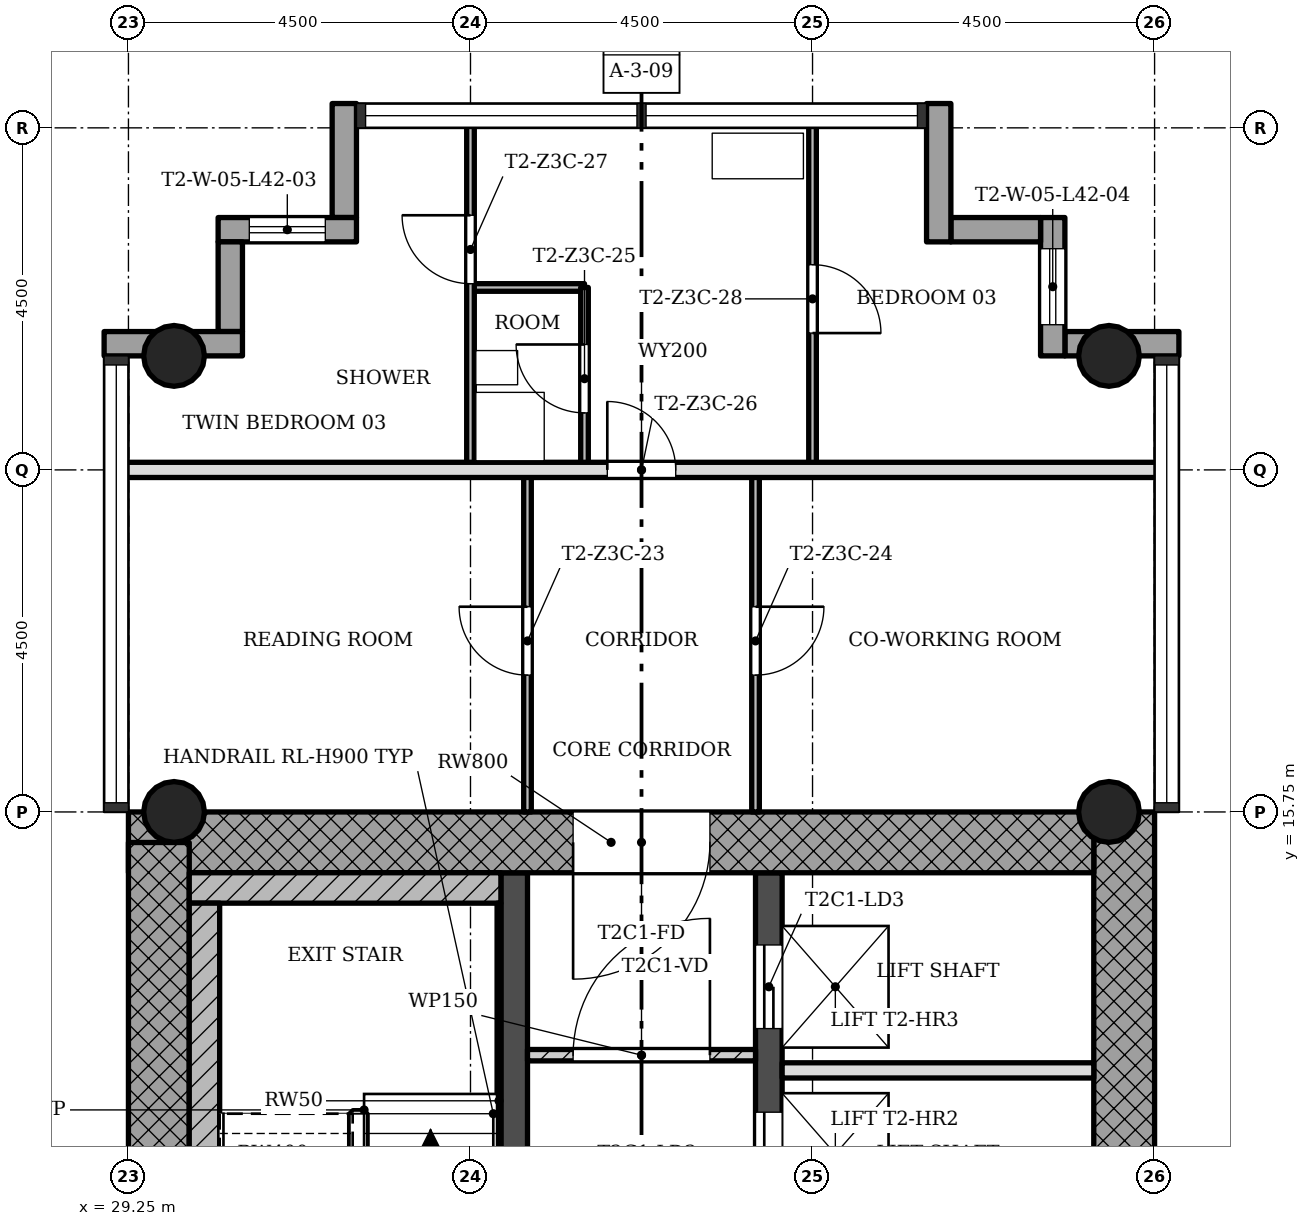
"""IFC4 building model, lengths in metres.
Left out: names, types, materials, properties, quantities, classifications, styles, units other than length and angle.
Written with IfcOpenShell. Run it as: python <this file> out.ifc"""

import sys

from ifc_helpers import new_model, si_unit, direction, frame, frame_2d, origin, origin_2d, place, context, subcontext, project, spatial, rectangle, hollow_circle, extrude, element, fill, save


model = new_model("IFC4")
c1 = context("Model", 3, precision=1e-05, world=origin(), true_north=direction((0.0, 1.0)))
c2 = subcontext(c1, "Body", "Model", "MODEL_VIEW")
j1 = project(units=[si_unit("LENGTHUNIT", "METRE"), si_unit("PLANEANGLEUNIT", "RADIAN")], contexts=[c1])
p1 = place(None, origin())
s1 = spatial("IfcSite", under=j1, at=p1, CompositionType="ELEMENT")
p2 = place(p1, origin())
s2 = spatial("IfcBuilding", under=s1, at=p2, CompositionType="ELEMENT")
p3 = place(p2, frame((0.0, 0.0, 154.1)))
s3 = spatial("IfcBuildingStorey", under=s2, at=p3, CompositionType="ELEMENT", Elevation=154.1)
p4 = place(p3, frame((42.35, 7.55, 0.0), z_axis=(0.0, 0.0, 1.0), x_axis=(0.0, 1.0, 0.0)))
e1 = element("IfcWall", 1, at=p4, inside=s3, PredefinedType="SHEAR", context=c2, shape_type="SweptSolid", body=[
    extrude(rectangle(XDim=8.2, YDim=0.8, at=frame_2d((4.1, 0.0))), origin(), (0.0, 0.0, 1.0), 3.4),
])
p5 = place(p3, frame((41.95, 15.35, 0.0), z_axis=(0.0, 0.0, 1.0), x_axis=(-1.0, 0.0, 0.0)))
e2 = element("IfcWall", 2, at=p5, inside=s3, PredefinedType="SHEAR", context=c2, shape_type="SweptSolid", body=[
    extrude(rectangle(XDim=12.7, YDim=0.8, at=frame_2d((6.35, 0.0))), origin(), (0.0, 0.0, 1.0), 3.4),
])
p6 = place(p5, frame((5.05, 0.0, 0.0)))
e3 = element("IfcOpeningElement", 3, at=p6, cuts=e2, PredefinedType="OPENING", context=c2, shape_type="SweptSolid", body=[
    extrude(rectangle(XDim=1.8, YDim=2.1, at=frame_2d((0.9, 1.05))), frame((0.0, 0.41, 0.0), z_axis=(0.0, -1.0, 0.0), x_axis=(1.0, 0.0, 0.0)), (0.0, 0.0, 1.0), 0.82),
])
p7 = place(p3, frame((29.65, 15.348, 0.0), z_axis=(0.0, 0.0, 1.0), x_axis=(0.0, -1.0, 0.0)))
e4 = element("IfcWall", 4, at=p7, inside=s3, PredefinedType="SHEAR", context=c2, shape_type="SweptSolid", body=[
    extrude(rectangle(XDim=8.796, YDim=0.8, at=frame_2d((4.398, 0.0))), origin(), (0.0, 0.0, 1.0), 3.4),
])
p8 = place(p3, frame((34.325, 7.55, 0.0), z_axis=(0.0, 0.0, 1.0), x_axis=(0.0, 1.0, 0.0)))
e5 = element("IfcWall", 5, at=p8, inside=s3, PredefinedType="SHEAR", context=c2, shape_type="SweptSolid", body=[
    extrude(rectangle(XDim=7.4, YDim=0.35, at=frame_2d((3.7, 0.0))), origin(), (0.0, 0.0, 1.0), 3.4),
])
p9 = place(p8, frame((0.85, 0.0, 0.0)))
e6 = element("IfcOpeningElement", 6, at=p9, cuts=e5, PredefinedType="OPENING", context=c2, shape_type="SweptSolid", body=[
    extrude(rectangle(XDim=0.9, YDim=2.1, at=frame_2d((0.45, 1.05))), frame((0.0, 0.185, 0.0), z_axis=(0.0, -1.0, 0.0), x_axis=(1.0, 0.0, 0.0)), (0.0, 0.0, 1.0), 0.37),
])
p10 = place(p3, frame((37.675, 7.55, 0.0), z_axis=(0.0, 0.0, 1.0), x_axis=(0.0, 1.0, 0.0)))
e7 = element("IfcWall", 7, at=p10, inside=s3, PredefinedType="SHEAR", context=c2, shape_type="SweptSolid", body=[
    extrude(rectangle(XDim=7.4, YDim=0.35, at=frame_2d((3.7, 0.0))), origin(), (0.0, 0.0, 1.0), 3.4),
])
p11 = place(p10, frame((0.95, 0.0, 0.0)))
e8 = element("IfcOpeningElement", 8, at=p11, cuts=e7, PredefinedType="OPENING", context=c2, shape_type="SweptSolid", body=[
    extrude(rectangle(XDim=1.1, YDim=2.1, at=frame_2d((0.55, 1.05))), frame((0.0, 0.185, 0.0), z_axis=(0.0, -1.0, 0.0), x_axis=(1.0, 0.0, 0.0)), (0.0, 0.0, 1.0), 0.37),
])
p12 = place(p10, frame((3.15, 0.0, 0.0)))
e9 = element("IfcOpeningElement", 9, at=p12, cuts=e7, PredefinedType="OPENING", context=c2, shape_type="SweptSolid", body=[
    extrude(rectangle(XDim=1.1, YDim=2.1, at=frame_2d((0.55, 1.05))), frame((0.0, 0.185, 0.0), z_axis=(0.0, -1.0, 0.0), x_axis=(1.0, 0.0, 0.0)), (0.0, 0.0, 1.0), 0.37),
])
p13 = place(p10, frame((5.35, 0.0, 0.0)))
e10 = element("IfcOpeningElement", 10, at=p13, cuts=e7, PredefinedType="OPENING", context=c2, shape_type="SweptSolid", body=[
    extrude(rectangle(XDim=1.1, YDim=2.1, at=frame_2d((0.55, 1.05))), frame((0.0, 0.185, 0.0), z_axis=(0.0, -1.0, 0.0), x_axis=(1.0, 0.0, 0.0)), (0.0, 0.0, 1.0), 0.37),
])
for number, where, z_axis, x_axis in (
    (11, (42.15, 15.75, 0.0), (0.0, 0.0, 1.0), (1.0, 0.0, 0.0)),
    (12, (29.85, 15.75, 0.0), (0.0, 0.0, 1.0), (1.0, 0.0, 0.0)),
    (13, (42.15, 21.75, 0.0), (0.0, 0.0, 1.0), (1.0, 0.0, 0.0)),
    (14, (29.85, 21.75, 0.0), (0.0, 0.0, 1.0), (1.0, 0.0, 0.0)),
):
    element("IfcColumn", number, at=place(p3, frame(where, z_axis=z_axis, x_axis=x_axis)), inside=s3, PredefinedType="COLUMN", context=c2, shape_type="SweptSolid", body=[
        extrude(hollow_circle(Radius=0.4, WallThickness=0.028, at=origin_2d()), origin(), (0.0, 0.0, 1.0), 3.4),
    ])
p14 = place(p3, frame((43.07, 21.91, -0.3), z_axis=(0.0, 0.0, 1.0), x_axis=(-1.0, 0.0, 0.0)))
e15 = element("IfcWall", 15, at=p14, inside=s3, PredefinedType="STANDARD", context=c2, shape_type="SweptSolid", body=[
    extrude(rectangle(XDim=1.5, YDim=0.32, at=frame_2d((0.75, 0.0))), origin(), (0.0, 0.0, 1.0), 3.4),
])
p15 = place(p3, frame((41.41, 21.75, -0.3), z_axis=(0.0, 0.0, 1.0), x_axis=(0.0, 1.0, 0.0)))
e16 = element("IfcWall", 16, at=p15, inside=s3, PredefinedType="STANDARD", context=c2, shape_type="SweptSolid", body=[
    extrude(rectangle(XDim=1.82, YDim=0.32, at=frame_2d((0.91, 0.0))), origin(), (0.0, 0.0, 1.0), 3.4),
])
p16 = place(p15, frame((0.41, 0.0, 1.2)))
e17 = element("IfcOpeningElement", 17, at=p16, cuts=e16, PredefinedType="OPENING", context=c2, shape_type="SweptSolid", body=[
    extrude(rectangle(XDim=1.0, YDim=1.5, at=frame_2d((0.5, 0.75))), frame((0.0, 0.17, 0.0), z_axis=(0.0, -1.0, 0.0), x_axis=(1.0, 0.0, 0.0)), (0.0, 0.0, 1.0), 0.34),
])
p17 = place(p3, frame((41.25, 23.41, -0.3), z_axis=(0.0, 0.0, 1.0), x_axis=(-1.0, 0.0, 0.0)))
e18 = element("IfcWall", 18, at=p17, inside=s3, PredefinedType="STANDARD", context=c2, shape_type="SweptSolid", body=[
    extrude(rectangle(XDim=1.18, YDim=0.32, at=frame_2d((0.59, 0.0))), origin(), (0.0, 0.0, 1.0), 3.4),
])
p18 = place(p3, frame((39.91, 23.25, -0.3), z_axis=(0.0, 0.0, 1.0), x_axis=(0.0, 1.0, 0.0)))
e19 = element("IfcWall", 19, at=p18, inside=s3, PredefinedType="STANDARD", context=c2, shape_type="SweptSolid", body=[
    extrude(rectangle(XDim=1.82, YDim=0.32, at=frame_2d((0.91, 0.0))), origin(), (0.0, 0.0, 1.0), 3.4),
])
p19 = place(p3, frame((32.09, 25.07, -0.3), z_axis=(0.0, 0.0, 1.0), x_axis=(0.0, -1.0, 0.0)))
e20 = element("IfcWall", 20, at=p19, inside=s3, PredefinedType="STANDARD", context=c2, shape_type="SweptSolid", body=[
    extrude(rectangle(XDim=1.5, YDim=0.32, at=frame_2d((0.75, 0.0))), origin(), (0.0, 0.0, 1.0), 3.4),
])
p20 = place(p3, frame((32.25, 23.41, -0.3), z_axis=(0.0, 0.0, 1.0), x_axis=(-1.0, 0.0, 0.0)))
e21 = element("IfcWall", 21, at=p20, inside=s3, PredefinedType="STANDARD", context=c2, shape_type="SweptSolid", body=[
    extrude(rectangle(XDim=1.82, YDim=0.32, at=frame_2d((0.91, 0.0))), origin(), (0.0, 0.0, 1.0), 3.4),
])
p21 = place(p20, frame((0.41, 0.0, 1.2)))
e22 = element("IfcOpeningElement", 22, at=p21, cuts=e21, PredefinedType="OPENING", context=c2, shape_type="SweptSolid", body=[
    extrude(rectangle(XDim=1.0, YDim=1.5, at=frame_2d((0.5, 0.75))), frame((0.0, 0.17, 0.0), z_axis=(0.0, -1.0, 0.0), x_axis=(1.0, 0.0, 0.0)), (0.0, 0.0, 1.0), 0.34),
])
p22 = place(p3, frame((30.59, 23.25, -0.3), z_axis=(0.0, 0.0, 1.0), x_axis=(0.0, -1.0, 0.0)))
e23 = element("IfcWall", 23, at=p22, inside=s3, PredefinedType="STANDARD", context=c2, shape_type="SweptSolid", body=[
    extrude(rectangle(XDim=1.18, YDim=0.32, at=frame_2d((0.59, 0.0))), origin(), (0.0, 0.0, 1.0), 3.4),
])
p23 = place(p3, frame((30.75, 21.91, -0.3), z_axis=(0.0, 0.0, 1.0), x_axis=(-1.0, 0.0, 0.0)))
e24 = element("IfcWall", 24, at=p23, inside=s3, PredefinedType="STANDARD", context=c2, shape_type="SweptSolid", body=[
    extrude(rectangle(XDim=1.82, YDim=0.32, at=frame_2d((0.91, 0.0))), origin(), (0.0, 0.0, 1.0), 3.4),
])
p24 = place(p3, frame((37.5, 12.55, 0.0), z_axis=(0.0, 0.0, 1.0), x_axis=(-1.0, 0.0, 0.0)))
e25 = element("IfcWall", 25, at=p24, inside=s3, PredefinedType="PARTITIONING", context=c2, shape_type="SweptSolid", body=[
    extrude(rectangle(XDim=3.0, YDim=0.15, at=frame_2d((1.5, 0.0))), origin(), (0.0, 0.0, 1.0), 3.0),
])
p25 = place(p24, frame((0.6, 0.0, 0.0)))
e26 = element("IfcOpeningElement", 26, at=p25, cuts=e25, PredefinedType="OPENING", context=c2, shape_type="SweptSolid", body=[
    extrude(rectangle(XDim=1.8, YDim=2.1, at=frame_2d((0.9, 1.05))), frame((0.0, 0.085, 0.0), z_axis=(0.0, -1.0, 0.0), x_axis=(1.0, 0.0, 0.0)), (0.0, 0.0, 1.0), 0.17),
])
p26 = place(p3, frame((41.95, 12.35, 0.0), z_axis=(0.0, 0.0, 1.0), x_axis=(-1.0, 0.0, 0.0)))
e27 = element("IfcWall", 27, at=p26, inside=s3, PredefinedType="SOLIDWALL", context=c2, shape_type="SweptSolid", body=[
    extrude(rectangle(XDim=4.1, YDim=0.2, at=frame_2d((2.05, 0.0))), origin(), (0.0, 0.0, 1.0), 3.0),
])
p27 = place(p3, frame((42.85, 20.25, 0.0), z_axis=(0.0, 0.0, 1.0), x_axis=(-1.0, 0.0, 0.0)))
e28 = element("IfcWall", 28, at=p27, inside=s3, PredefinedType="SOLIDWALL", context=c2, shape_type="SweptSolid", body=[
    extrude(rectangle(XDim=13.7, YDim=0.2, at=frame_2d((6.85, 0.0))), origin(), (0.0, 0.0, 1.0), 3.0),
])
p28 = place(p27, frame((6.4, 0.0, 0.0)))
e29 = element("IfcOpeningElement", 29, at=p28, cuts=e28, PredefinedType="OPENING", context=c2, shape_type="SweptSolid", body=[
    extrude(rectangle(XDim=0.9, YDim=2.1, at=frame_2d((0.45, 1.05))), frame((0.0, 0.11, 0.0), z_axis=(0.0, -1.0, 0.0), x_axis=(1.0, 0.0, 0.0)), (0.0, 0.0, 1.0), 0.22),
])
p29 = place(p3, frame((35.25, 22.65, 0.0), z_axis=(0.0, 0.0, 1.0), x_axis=(-1.0, 0.0, 0.0)))
e30 = element("IfcWall", 30, at=p29, inside=s3, PredefinedType="PARTITIONING", context=c2, shape_type="SweptSolid", body=[
    extrude(rectangle(XDim=1.5, YDim=0.1, at=frame_2d((0.75, 0.0))), origin(), (0.0, 0.0, 1.0), 3.0),
])
p30 = place(p3, frame((38.25, 20.25, 0.0), z_axis=(0.0, 0.0, 1.0), x_axis=(0.0, 1.0, 0.0)))
e31 = element("IfcWall", 31, at=p30, inside=s3, PredefinedType="PARTITIONING", context=c2, shape_type="SweptSolid", body=[
    extrude(rectangle(XDim=4.6, YDim=0.1, at=frame_2d((2.3, 0.0))), origin(), (0.0, 0.0, 1.0), 3.0),
])
p31 = place(p30, frame((1.8, 0.0, 0.0)))
e32 = element("IfcOpeningElement", 32, at=p31, cuts=e31, PredefinedType="OPENING", context=c2, shape_type="SweptSolid", body=[
    extrude(rectangle(XDim=0.9, YDim=2.1, at=frame_2d((0.45, 1.05))), frame((0.0, 0.06, 0.0), z_axis=(0.0, -1.0, 0.0), x_axis=(1.0, 0.0, 0.0)), (0.0, 0.0, 1.0), 0.12),
])
p32 = place(p3, frame((37.5, 15.75, 0.0), z_axis=(0.0, 0.0, 1.0), x_axis=(0.0, 1.0, 0.0)))
e33 = element("IfcWall", 33, at=p32, inside=s3, PredefinedType="PARTITIONING", context=c2, shape_type="SweptSolid", body=[
    extrude(rectangle(XDim=4.5, YDim=0.1, at=frame_2d((2.25, 0.0))), origin(), (0.0, 0.0, 1.0), 3.0),
])
p33 = place(p32, frame((1.8, 0.0, 0.0)))
e34 = element("IfcOpeningElement", 34, at=p33, cuts=e33, PredefinedType="OPENING", context=c2, shape_type="SweptSolid", body=[
    extrude(rectangle(XDim=0.9, YDim=2.1, at=frame_2d((0.45, 1.05))), frame((0.0, 0.06, 0.0), z_axis=(0.0, -1.0, 0.0), x_axis=(1.0, 0.0, 0.0)), (0.0, 0.0, 1.0), 0.12),
])
p34 = place(p3, frame((35.25, 20.25, 0.0), z_axis=(0.0, 0.0, 1.0), x_axis=(0.0, 1.0, 0.0)))
e35 = element("IfcWall", 35, at=p34, inside=s3, PredefinedType="PARTITIONING", context=c2, shape_type="SweptSolid", body=[
    extrude(rectangle(XDim=2.4, YDim=0.1, at=frame_2d((1.2, 0.0))), origin(), (0.0, 0.0, 1.0), 3.0),
])
p35 = place(p34, frame((0.75, 0.0, 0.0)))
e36 = element("IfcOpeningElement", 36, at=p35, cuts=e35, PredefinedType="OPENING", context=c2, shape_type="SweptSolid", body=[
    extrude(rectangle(XDim=0.9, YDim=2.1, at=frame_2d((0.45, 1.05))), frame((0.0, 0.06, 0.0), z_axis=(0.0, -1.0, 0.0), x_axis=(1.0, 0.0, 0.0)), (0.0, 0.0, 1.0), 0.12),
])
p36 = place(p3, frame((34.5, 15.75, 0.0), z_axis=(0.0, 0.0, 1.0), x_axis=(0.0, 1.0, 0.0)))
e37 = element("IfcWall", 37, at=p36, inside=s3, PredefinedType="PARTITIONING", context=c2, shape_type="SweptSolid", body=[
    extrude(rectangle(XDim=4.5, YDim=0.1, at=frame_2d((2.25, 0.0))), origin(), (0.0, 0.0, 1.0), 3.0),
])
p37 = place(p36, frame((1.8, 0.0, 0.0)))
e38 = element("IfcOpeningElement", 38, at=p37, cuts=e37, PredefinedType="OPENING", context=c2, shape_type="SweptSolid", body=[
    extrude(rectangle(XDim=0.9, YDim=2.1, at=frame_2d((0.45, 1.05))), frame((0.0, 0.06, 0.0), z_axis=(0.0, -1.0, 0.0), x_axis=(1.0, 0.0, 0.0)), (0.0, 0.0, 1.0), 0.12),
])
p38 = place(p3, frame((33.75, 20.25, 0.0), z_axis=(0.0, 0.0, 1.0), x_axis=(0.0, 1.0, 0.0)))
e39 = element("IfcWall", 39, at=p38, inside=s3, PredefinedType="PARTITIONING", context=c2, shape_type="SweptSolid", body=[
    extrude(rectangle(XDim=4.6, YDim=0.1, at=frame_2d((2.3, 0.0))), origin(), (0.0, 0.0, 1.0), 3.0),
])
p39 = place(p38, frame((2.45, 0.0, 0.0)))
e40 = element("IfcOpeningElement", 40, at=p39, cuts=e39, PredefinedType="OPENING", context=c2, shape_type="SweptSolid", body=[
    extrude(rectangle(XDim=0.9, YDim=2.1, at=frame_2d((0.45, 1.05))), frame((0.0, 0.06, 0.0), z_axis=(0.0, -1.0, 0.0), x_axis=(1.0, 0.0, 0.0)), (0.0, 0.0, 1.0), 0.12),
])
p40 = place(p3, frame((34.15, 14.75, 0.0), z_axis=(0.0, 0.0, 1.0), x_axis=(-1.0, 0.0, 0.0)))
e41 = element("IfcWall", 41, at=p40, inside=s3, PredefinedType="SHEAR", context=c2, shape_type="SweptSolid", body=[
    extrude(rectangle(XDim=4.1, YDim=0.4, at=frame_2d((2.05, 0.0))), origin(), (0.0, 0.0, 1.0), 3.4),
])
p41 = place(p3, frame((30.25, 7.95, 0.0), z_axis=(0.0, 0.0, 1.0), x_axis=(0.0, 1.0, 0.0)))
e42 = element("IfcWall", 42, at=p41, inside=s3, PredefinedType="SHEAR", context=c2, shape_type="SweptSolid", body=[
    extrude(rectangle(XDim=6.6, YDim=0.4, at=frame_2d((3.3, 0.0))), origin(), (0.0, 0.0, 1.0), 3.4),
])
p42 = place(p3, frame((34.125, 9.35, 0.0), z_axis=(0.0, 0.0, 1.0), x_axis=(0.0, 1.0, 0.0)))
e43 = element("IfcWall", 43, at=p42, inside=s3, PredefinedType="SHEAR", context=c2, shape_type="SweptSolid", body=[
    extrude(rectangle(XDim=5.2, YDim=0.05, at=frame_2d((2.6, 0.0))), origin(), (0.0, 0.0, 1.0), 3.4),
])
p43 = place(p25, origin())
e44 = element("IfcDoor", 44, at=p43, inside=s3, OperationType="SINGLE_SWING_LEFT", PredefinedType="DOOR", context=c2, shape_type="SweptSolid", body=[
    extrude(rectangle(XDim=1.8, YDim=2.1, at=frame_2d((0.9, 1.05))), frame((0.0, 0.025, 0.0), z_axis=(0.0, -1.0, 0.0), x_axis=(1.0, 0.0, 0.0)), (0.0, 0.0, 1.0), 0.05),
])
fill(e26, e44)
p44 = place(p37, origin())
e45 = element("IfcDoor", 45, at=p44, inside=s3, OperationType="SINGLE_SWING_LEFT", PredefinedType="DOOR", context=c2, shape_type="SweptSolid", body=[
    extrude(rectangle(XDim=0.9, YDim=2.1, at=frame_2d((0.45, 1.05))), frame((0.0, 0.025, 0.0), z_axis=(0.0, -1.0, 0.0), x_axis=(1.0, 0.0, 0.0)), (0.0, 0.0, 1.0), 0.05),
])
fill(e38, e45)
p45 = place(p33, origin())
e46 = element("IfcDoor", 46, at=p45, inside=s3, OperationType="SINGLE_SWING_RIGHT", PredefinedType="DOOR", context=c2, shape_type="SweptSolid", body=[
    extrude(rectangle(XDim=0.9, YDim=2.1, at=frame_2d((0.45, 1.05))), frame((0.0, 0.025, 0.0), z_axis=(0.0, -1.0, 0.0), x_axis=(1.0, 0.0, 0.0)), (0.0, 0.0, 1.0), 0.05),
])
fill(e34, e46)
p46 = place(p35, origin())
e47 = element("IfcDoor", 47, at=p46, inside=s3, OperationType="SINGLE_SWING_LEFT", PredefinedType="DOOR", context=c2, shape_type="SweptSolid", body=[
    extrude(rectangle(XDim=0.9, YDim=2.1, at=frame_2d((0.45, 1.05))), frame((0.0, 0.025, 0.0), z_axis=(0.0, -1.0, 0.0), x_axis=(1.0, 0.0, 0.0)), (0.0, 0.0, 1.0), 0.05),
])
fill(e36, e47)
p47 = place(p28, origin())
e48 = element("IfcDoor", 48, at=p47, inside=s3, OperationType="SINGLE_SWING_RIGHT", PredefinedType="DOOR", context=c2, shape_type="SweptSolid", body=[
    extrude(rectangle(XDim=0.9, YDim=2.1, at=frame_2d((0.45, 1.05))), frame((0.0, 0.025, 0.0), z_axis=(0.0, -1.0, 0.0), x_axis=(1.0, 0.0, 0.0)), (0.0, 0.0, 1.0), 0.05),
])
fill(e29, e48)
p48 = place(p39, origin())
e49 = element("IfcDoor", 49, at=p48, inside=s3, OperationType="SINGLE_SWING_LEFT", PredefinedType="DOOR", context=c2, shape_type="SweptSolid", body=[
    extrude(rectangle(XDim=0.9, YDim=2.1, at=frame_2d((0.45, 1.05))), frame((0.0, 0.025, 0.0), z_axis=(0.0, -1.0, 0.0), x_axis=(1.0, 0.0, 0.0)), (0.0, 0.0, 1.0), 0.05),
])
fill(e40, e49)
p49 = place(p31, origin())
e50 = element("IfcDoor", 50, at=p49, inside=s3, OperationType="SINGLE_SWING_LEFT", PredefinedType="DOOR", context=c2, shape_type="SweptSolid", body=[
    extrude(rectangle(XDim=0.9, YDim=2.1, at=frame_2d((0.45, 1.05))), frame((0.0, 0.025, 0.0), z_axis=(0.0, -1.0, 0.0), x_axis=(1.0, 0.0, 0.0)), (0.0, 0.0, 1.0), 0.05),
])
fill(e32, e50)
p50 = place(p12, origin())
e51 = element("IfcDoor", 51, at=p50, inside=s3, OperationType="SLIDING_TO_LEFT", PredefinedType="DOOR", context=c2, shape_type="SweptSolid", body=[
    extrude(rectangle(XDim=1.1, YDim=2.1, at=frame_2d((0.55, 1.05))), frame((0.0, 0.025, 0.0), z_axis=(0.0, -1.0, 0.0), x_axis=(1.0, 0.0, 0.0)), (0.0, 0.0, 1.0), 0.05),
])
fill(e9, e51)
p51 = place(p13, origin())
e52 = element("IfcDoor", 52, at=p51, inside=s3, OperationType="SLIDING_TO_LEFT", PredefinedType="DOOR", context=c2, shape_type="SweptSolid", body=[
    extrude(rectangle(XDim=1.1, YDim=2.1, at=frame_2d((0.55, 1.05))), frame((0.0, 0.025, 0.0), z_axis=(0.0, -1.0, 0.0), x_axis=(1.0, 0.0, 0.0)), (0.0, 0.0, 1.0), 0.05),
])
fill(e10, e52)
p52 = place(p6, origin())
e53 = element("IfcDoor", 53, at=p52, inside=s3, OperationType="SINGLE_SWING_LEFT", PredefinedType="DOOR", context=c2, shape_type="SweptSolid", body=[
    extrude(rectangle(XDim=1.8, YDim=2.1, at=frame_2d((0.9, 1.05))), frame((0.0, 0.025, 0.0), z_axis=(0.0, -1.0, 0.0), x_axis=(1.0, 0.0, 0.0)), (0.0, 0.0, 1.0), 0.05),
])
fill(e3, e53)
p53 = place(p21, origin())
e54 = element("IfcWindow", 54, at=p53, inside=s3, PartitioningType="SINGLE_PANEL", PredefinedType="WINDOW", context=c2, shape_type="SweptSolid", body=[
    extrude(rectangle(XDim=1.0, YDim=1.5, at=frame_2d((0.5, 0.75))), frame((0.0, 0.03, 0.0), z_axis=(0.0, -1.0, 0.0), x_axis=(1.0, 0.0, 0.0)), (0.0, 0.0, 1.0), 0.06),
])
fill(e22, e54)
p54 = place(p16, origin())
e55 = element("IfcWindow", 55, at=p54, inside=s3, PartitioningType="SINGLE_PANEL", PredefinedType="WINDOW", context=c2, shape_type="SweptSolid", body=[
    extrude(rectangle(XDim=1.0, YDim=1.5, at=frame_2d((0.5, 0.75))), frame((0.0, 0.03, 0.0), z_axis=(0.0, -1.0, 0.0), x_axis=(1.0, 0.0, 0.0)), (0.0, 0.0, 1.0), 0.06),
])
fill(e17, e55)
save(model, sys.argv[1])
